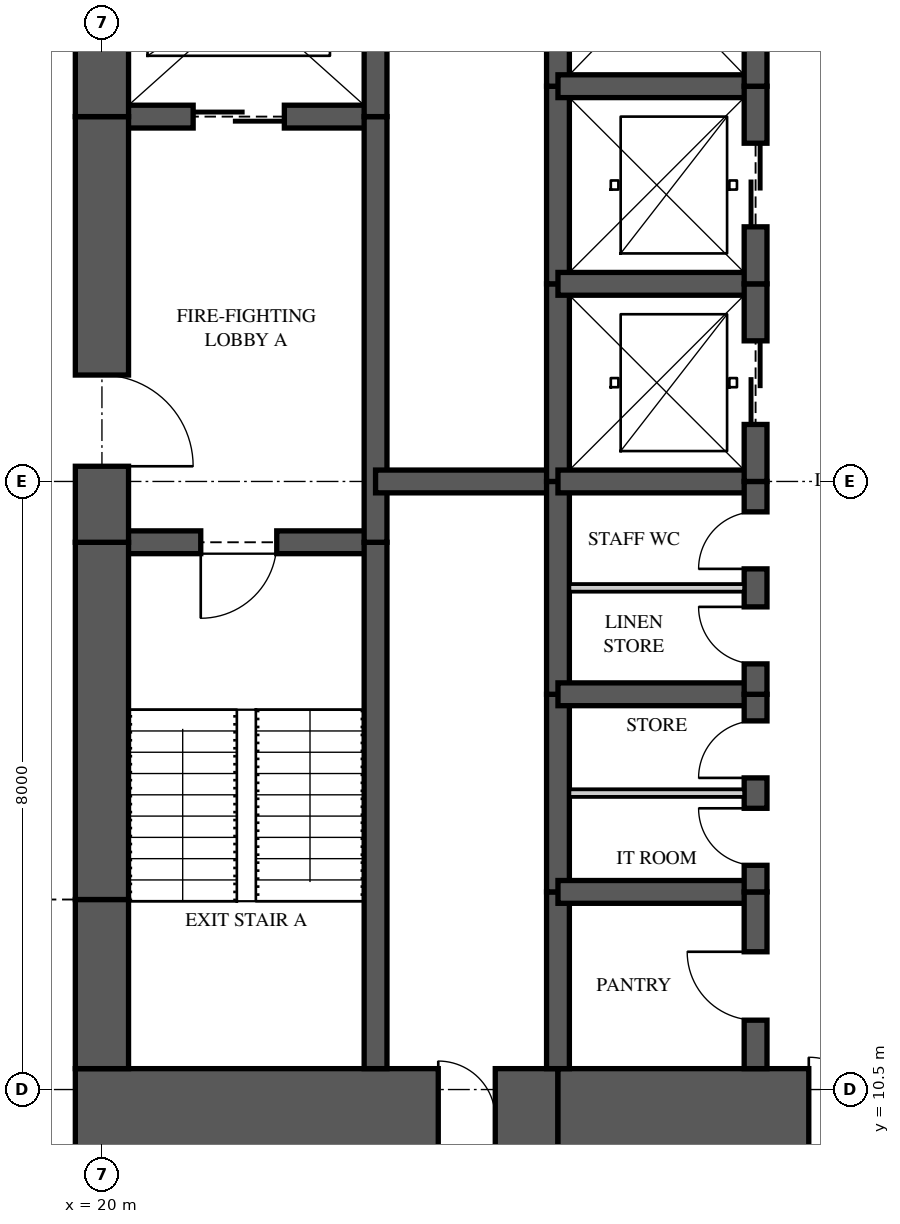
"""IFC4 building model, lengths in metres.
Left out: names, types, materials, properties, quantities, classifications, styles, units other than length and angle.
Written with IfcOpenShell. Run it as: python <this file> out.ifc"""

import sys

from ifc_helpers import new_model, si_unit, direction, frame, frame_2d, origin, place, context, subcontext, project, spatial, rectangle, extrude, element, fill, save


model = new_model("IFC4")
c1 = context("Model", 3, precision=1e-05, world=origin(), true_north=direction((0.0, 1.0)))
c2 = subcontext(c1, "Body", "Model", "MODEL_VIEW")
j1 = project(units=[si_unit("LENGTHUNIT", "METRE"), si_unit("PLANEANGLEUNIT", "RADIAN")], contexts=[c1])
p1 = place(None, origin())
s1 = spatial("IfcSite", under=j1, at=p1, CompositionType="ELEMENT")
p2 = place(p1, origin())
s2 = spatial("IfcBuilding", under=s1, at=p2, CompositionType="ELEMENT")
p3 = place(p2, frame((0.0, 0.0, 191.2)))
s3 = spatial("IfcBuildingStorey", under=s2, at=p3, CompositionType="ELEMENT", Elevation=191.2)
p4 = place(p3, frame((19.65, 10.125, 0.0), z_axis=(0.0, 0.0, 1.0), x_axis=(1.0, 0.0, 0.0)))
e1 = element("IfcWall", 1, at=p4, inside=s3, PredefinedType="SHEAR", context=c2, shape_type="SweptSolid", body=[
    extrude(rectangle(XDim=6.35, YDim=1.3, at=frame_2d((3.175, 0.0))), origin(), (0.0, 0.0, 1.0), 3.35),
])
p5 = place(p4, frame((4.775, 0.0, 0.0)))
e2 = element("IfcOpeningElement", 2, at=p5, cuts=e1, PredefinedType="OPENING", context=c2, shape_type="SweptSolid", body=[
    extrude(rectangle(XDim=0.75, YDim=2.1, at=frame_2d((0.375, 1.05))), frame((0.0, 0.66, 0.0), z_axis=(0.0, -1.0, 0.0), x_axis=(1.0, 0.0, 0.0)), (0.0, 0.0, 1.0), 1.32),
])
p6 = place(p3, frame((26.0, 10.125, 0.0), z_axis=(0.0, 0.0, 1.0), x_axis=(1.0, 0.0, 0.0)))
e3 = element("IfcWall", 3, at=p6, inside=s3, PredefinedType="SHEAR", context=c2, shape_type="SweptSolid", body=[
    extrude(rectangle(XDim=5.6, YDim=1.3, at=frame_2d((2.8, 0.0))), origin(), (0.0, 0.0, 1.0), 3.35),
])
p7 = place(p6, frame((3.3, 0.0, 0.0)))
e4 = element("IfcOpeningElement", 4, at=p7, cuts=e3, PredefinedType="OPENING", context=c2, shape_type="SweptSolid", body=[
    extrude(rectangle(XDim=1.6, YDim=2.1, at=frame_2d((0.8, 1.05))), frame((0.0, 0.66, 0.0), z_axis=(0.0, -1.0, 0.0), x_axis=(1.0, 0.0, 0.0)), (0.0, 0.0, 1.0), 1.32),
])
p8 = place(p3, frame((20.0, 26.225, 0.0), z_axis=(0.0, 0.0, 1.0), x_axis=(0.0, -1.0, 0.0)))
e5 = element("IfcWall", 5, at=p8, inside=s3, PredefinedType="SHEAR", context=c2, shape_type="SweptSolid", body=[
    extrude(rectangle(XDim=2.925, YDim=0.7, at=frame_2d((1.462, 0.0))), origin(), (0.0, 0.0, 1.0), 3.35),
])
p9 = place(p3, frame((20.0, 23.3, 0.0), z_axis=(0.0, 0.0, 1.0), x_axis=(0.0, -1.0, 0.0)))
e6 = element("IfcWall", 6, at=p9, inside=s3, PredefinedType="SHEAR", context=c2, shape_type="SweptSolid", body=[
    extrude(rectangle(XDim=5.6, YDim=0.7, at=frame_2d((2.8, 0.0))), origin(), (0.0, 0.0, 1.0), 3.35),
])
p10 = place(p9, frame((3.4, 0.0, 0.0)))
e7 = element("IfcOpeningElement", 7, at=p10, cuts=e6, PredefinedType="OPENING", context=c2, shape_type="SweptSolid", body=[
    extrude(rectangle(XDim=1.2, YDim=2.2, at=frame_2d((0.6, 1.1))), frame((0.0, 0.36, 0.0), z_axis=(0.0, -1.0, 0.0), x_axis=(1.0, 0.0, 0.0)), (0.0, 0.0, 1.0), 0.72),
])
p11 = place(p3, frame((20.0, 17.7, 0.0), z_axis=(0.0, 0.0, 1.0), x_axis=(0.0, -1.0, 0.0)))
e8 = element("IfcWall", 8, at=p11, inside=s3, PredefinedType="SHEAR", context=c2, shape_type="SweptSolid", body=[
    extrude(rectangle(XDim=4.7, YDim=0.7, at=frame_2d((2.35, 0.0))), origin(), (0.0, 0.0, 1.0), 3.35),
])
p12 = place(p3, frame((20.0, 13.0, 0.0), z_axis=(0.0, 0.0, 1.0), x_axis=(0.0, -1.0, 0.0)))
e9 = element("IfcWall", 9, at=p12, inside=s3, PredefinedType="SHEAR", context=c2, shape_type="SweptSolid", body=[
    extrude(rectangle(XDim=2.225, YDim=0.7, at=frame_2d((1.113, 0.0))), origin(), (0.0, 0.0, 1.0), 3.35),
])
p13 = place(p3, frame((23.6, 10.775, 0.0), z_axis=(0.0, 0.0, 1.0), x_axis=(0.0, 1.0, 0.0)))
e10 = element("IfcWall", 10, at=p13, inside=s3, PredefinedType="SHEAR", context=c2, shape_type="SweptSolid", body=[
    extrude(rectangle(XDim=6.925, YDim=0.3, at=frame_2d((3.462, 0.0))), origin(), (0.0, 0.0, 1.0), 3.35),
])
p14 = place(p3, frame((23.6, 17.7, 0.0), z_axis=(0.0, 0.0, 1.0), x_axis=(0.0, 1.0, 0.0)))
e11 = element("IfcWall", 11, at=p14, inside=s3, PredefinedType="SHEAR", context=c2, shape_type="SweptSolid", body=[
    extrude(rectangle(XDim=5.6, YDim=0.3, at=frame_2d((2.8, 0.0))), origin(), (0.0, 0.0, 1.0), 3.35),
])
p15 = place(p3, frame((23.6, 23.3, 0.0), z_axis=(0.0, 0.0, 1.0), x_axis=(0.0, 1.0, 0.0)))
e12 = element("IfcWall", 12, at=p15, inside=s3, PredefinedType="SHEAR", context=c2, shape_type="SweptSolid", body=[
    extrude(rectangle(XDim=2.925, YDim=0.3, at=frame_2d((1.462, 0.0))), origin(), (0.0, 0.0, 1.0), 3.35),
])
p16 = place(p3, frame((26.0, 10.775, 0.0), z_axis=(0.0, 0.0, 1.0), x_axis=(0.0, 1.0, 0.0)))
e13 = element("IfcWall", 13, at=p16, inside=s3, PredefinedType="SHEAR", context=c2, shape_type="SweptSolid", body=[
    extrude(rectangle(XDim=2.325, YDim=0.3, at=frame_2d((1.163, 0.0))), origin(), (0.0, 0.0, 1.0), 3.35),
])
p17 = place(p3, frame((26.0, 13.1, 0.0), z_axis=(0.0, 0.0, 1.0), x_axis=(0.0, 1.0, 0.0)))
e14 = element("IfcWall", 14, at=p17, inside=s3, PredefinedType="SHEAR", context=c2, shape_type="SweptSolid", body=[
    extrude(rectangle(XDim=2.6, YDim=0.3, at=frame_2d((1.3, 0.0))), origin(), (0.0, 0.0, 1.0), 3.35),
])
p18 = place(p3, frame((26.0, 15.7, 0.0), z_axis=(0.0, 0.0, 1.0), x_axis=(0.0, 1.0, 0.0)))
e15 = element("IfcWall", 15, at=p18, inside=s3, PredefinedType="SHEAR", context=c2, shape_type="SweptSolid", body=[
    extrude(rectangle(XDim=2.8, YDim=0.3, at=frame_2d((1.4, 0.0))), origin(), (0.0, 0.0, 1.0), 3.35),
])
p19 = place(p3, frame((26.0, 18.5, 0.0), z_axis=(0.0, 0.0, 1.0), x_axis=(0.0, 1.0, 0.0)))
e16 = element("IfcWall", 16, at=p19, inside=s3, PredefinedType="SHEAR", context=c2, shape_type="SweptSolid", body=[
    extrude(rectangle(XDim=2.6, YDim=0.3, at=frame_2d((1.3, 0.0))), origin(), (0.0, 0.0, 1.0), 3.35),
])
p20 = place(p3, frame((26.0, 21.1, 0.0), z_axis=(0.0, 0.0, 1.0), x_axis=(0.0, 1.0, 0.0)))
e17 = element("IfcWall", 17, at=p20, inside=s3, PredefinedType="SHEAR", context=c2, shape_type="SweptSolid", body=[
    extrude(rectangle(XDim=2.6, YDim=0.3, at=frame_2d((1.3, 0.0))), origin(), (0.0, 0.0, 1.0), 3.35),
])
p21 = place(p3, frame((26.0, 23.7, 0.0), z_axis=(0.0, 0.0, 1.0), x_axis=(0.0, 1.0, 0.0)))
e18 = element("IfcWall", 18, at=p21, inside=s3, PredefinedType="SHEAR", context=c2, shape_type="SweptSolid", body=[
    extrude(rectangle(XDim=2.525, YDim=0.3, at=frame_2d((1.263, 0.0))), origin(), (0.0, 0.0, 1.0), 3.35),
])
p22 = place(p3, frame((28.6, 10.775, 0.0), z_axis=(0.0, 0.0, 1.0), x_axis=(0.0, 1.0, 0.0)))
e19 = element("IfcWall", 19, at=p22, inside=s3, PredefinedType="SHEAR", context=c2, shape_type="SweptSolid", body=[
    extrude(rectangle(XDim=2.325, YDim=0.3, at=frame_2d((1.163, 0.0))), origin(), (0.0, 0.0, 1.0), 3.35),
])
p23 = place(p22, frame((0.637, 0.0, 0.0)))
e20 = element("IfcOpeningElement", 20, at=p23, cuts=e19, PredefinedType="OPENING", context=c2, shape_type="SweptSolid", body=[
    extrude(rectangle(XDim=0.9, YDim=2.1, at=frame_2d((0.45, 1.05))), frame((0.0, 0.16, 0.0), z_axis=(0.0, -1.0, 0.0), x_axis=(1.0, 0.0, 0.0)), (0.0, 0.0, 1.0), 0.32),
])
p24 = place(p3, frame((28.6, 13.1, 0.0), z_axis=(0.0, 0.0, 1.0), x_axis=(0.0, 1.0, 0.0)))
e21 = element("IfcWall", 21, at=p24, inside=s3, PredefinedType="SHEAR", context=c2, shape_type="SweptSolid", body=[
    extrude(rectangle(XDim=2.6, YDim=0.3, at=frame_2d((1.3, 0.0))), origin(), (0.0, 0.0, 1.0), 3.35),
])
p25 = place(p24, frame((0.35, 0.0, 0.0)))
e22 = element("IfcOpeningElement", 22, at=p25, cuts=e21, PredefinedType="OPENING", context=c2, shape_type="SweptSolid", body=[
    extrude(rectangle(XDim=0.75, YDim=2.1, at=frame_2d((0.375, 1.05))), frame((0.0, 0.16, 0.0), z_axis=(0.0, -1.0, 0.0), x_axis=(1.0, 0.0, 0.0)), (0.0, 0.0, 1.0), 0.32),
])
p26 = place(p24, frame((1.5, 0.0, 0.0)))
e23 = element("IfcOpeningElement", 23, at=p26, cuts=e21, PredefinedType="OPENING", context=c2, shape_type="SweptSolid", body=[
    extrude(rectangle(XDim=0.75, YDim=2.1, at=frame_2d((0.375, 1.05))), frame((0.0, 0.16, 0.0), z_axis=(0.0, -1.0, 0.0), x_axis=(1.0, 0.0, 0.0)), (0.0, 0.0, 1.0), 0.32),
])
p27 = place(p3, frame((28.6, 15.7, 0.0), z_axis=(0.0, 0.0, 1.0), x_axis=(0.0, 1.0, 0.0)))
e24 = element("IfcWall", 24, at=p27, inside=s3, PredefinedType="SHEAR", context=c2, shape_type="SweptSolid", body=[
    extrude(rectangle(XDim=2.8, YDim=0.3, at=frame_2d((1.4, 0.0))), origin(), (0.0, 0.0, 1.0), 3.35),
])
p28 = place(p27, frame((0.4, 0.0, 0.0)))
e25 = element("IfcOpeningElement", 25, at=p28, cuts=e24, PredefinedType="OPENING", context=c2, shape_type="SweptSolid", body=[
    extrude(rectangle(XDim=0.75, YDim=2.1, at=frame_2d((0.375, 1.05))), frame((0.0, 0.16, 0.0), z_axis=(0.0, -1.0, 0.0), x_axis=(1.0, 0.0, 0.0)), (0.0, 0.0, 1.0), 0.32),
])
p29 = place(p27, frame((1.65, 0.0, 0.0)))
e26 = element("IfcOpeningElement", 26, at=p29, cuts=e24, PredefinedType="OPENING", context=c2, shape_type="SweptSolid", body=[
    extrude(rectangle(XDim=0.75, YDim=2.1, at=frame_2d((0.375, 1.05))), frame((0.0, 0.16, 0.0), z_axis=(0.0, -1.0, 0.0), x_axis=(1.0, 0.0, 0.0)), (0.0, 0.0, 1.0), 0.32),
])
p30 = place(p3, frame((28.6, 18.5, 0.0), z_axis=(0.0, 0.0, 1.0), x_axis=(0.0, 1.0, 0.0)))
e27 = element("IfcWall", 27, at=p30, inside=s3, PredefinedType="SHEAR", context=c2, shape_type="SweptSolid", body=[
    extrude(rectangle(XDim=2.6, YDim=0.3, at=frame_2d((1.3, 0.0))), origin(), (0.0, 0.0, 1.0), 3.35),
])
p31 = place(p30, frame((0.75, 0.0, 0.0)))
e28 = element("IfcOpeningElement", 28, at=p31, cuts=e27, PredefinedType="OPENING", context=c2, shape_type="SweptSolid", body=[
    extrude(rectangle(XDim=1.1, YDim=2.1, at=frame_2d((0.55, 1.05))), frame((0.0, 0.16, 0.0), z_axis=(0.0, -1.0, 0.0), x_axis=(1.0, 0.0, 0.0)), (0.0, 0.0, 1.0), 0.32),
])
p32 = place(p3, frame((28.6, 21.1, 0.0), z_axis=(0.0, 0.0, 1.0), x_axis=(0.0, 1.0, 0.0)))
e29 = element("IfcWall", 29, at=p32, inside=s3, PredefinedType="SHEAR", context=c2, shape_type="SweptSolid", body=[
    extrude(rectangle(XDim=2.6, YDim=0.3, at=frame_2d((1.3, 0.0))), origin(), (0.0, 0.0, 1.0), 3.35),
])
p33 = place(p32, frame((0.75, 0.0, 0.0)))
e30 = element("IfcOpeningElement", 30, at=p33, cuts=e29, PredefinedType="OPENING", context=c2, shape_type="SweptSolid", body=[
    extrude(rectangle(XDim=1.1, YDim=2.1, at=frame_2d((0.55, 1.05))), frame((0.0, 0.16, 0.0), z_axis=(0.0, -1.0, 0.0), x_axis=(1.0, 0.0, 0.0)), (0.0, 0.0, 1.0), 0.32),
])
p34 = place(p3, frame((28.6, 23.7, 0.0), z_axis=(0.0, 0.0, 1.0), x_axis=(0.0, 1.0, 0.0)))
e31 = element("IfcWall", 31, at=p34, inside=s3, PredefinedType="SHEAR", context=c2, shape_type="SweptSolid", body=[
    extrude(rectangle(XDim=2.525, YDim=0.3, at=frame_2d((1.263, 0.0))), origin(), (0.0, 0.0, 1.0), 3.35),
])
p35 = place(p34, frame((0.85, 0.0, 0.0)))
e32 = element("IfcOpeningElement", 32, at=p35, cuts=e31, PredefinedType="OPENING", context=c2, shape_type="SweptSolid", body=[
    extrude(rectangle(XDim=1.1, YDim=2.1, at=frame_2d((0.55, 1.05))), frame((0.0, 0.16, 0.0), z_axis=(0.0, -1.0, 0.0), x_axis=(1.0, 0.0, 0.0)), (0.0, 0.0, 1.0), 0.32),
])
p36 = place(p3, frame((20.0, 17.7, 0.0), z_axis=(0.0, 0.0, 1.0), x_axis=(1.0, 0.0, 0.0)))
e33 = element("IfcWall", 33, at=p36, inside=s3, PredefinedType="SHEAR", context=c2, shape_type="SweptSolid", body=[
    extrude(rectangle(XDim=3.6, YDim=0.3, at=frame_2d((1.8, 0.0))), origin(), (0.0, 0.0, 1.0), 3.35),
])
p37 = place(p36, frame((1.3, 0.0, 0.0)))
e34 = element("IfcOpeningElement", 34, at=p37, cuts=e33, PredefinedType="OPENING", context=c2, shape_type="SweptSolid", body=[
    extrude(rectangle(XDim=1.0, YDim=2.1, at=frame_2d((0.5, 1.05))), frame((0.0, 0.16, 0.0), z_axis=(0.0, -1.0, 0.0), x_axis=(1.0, 0.0, 0.0)), (0.0, 0.0, 1.0), 0.32),
])
p38 = place(p3, frame((20.0, 23.3, 0.0), z_axis=(0.0, 0.0, 1.0), x_axis=(1.0, 0.0, 0.0)))
e35 = element("IfcWall", 35, at=p38, inside=s3, PredefinedType="SHEAR", context=c2, shape_type="SweptSolid", body=[
    extrude(rectangle(XDim=3.6, YDim=0.3, at=frame_2d((1.8, 0.0))), origin(), (0.0, 0.0, 1.0), 3.35),
])
p39 = place(p38, frame((1.2, 0.0, 0.0)))
e36 = element("IfcOpeningElement", 36, at=p39, cuts=e35, PredefinedType="OPENING", context=c2, shape_type="SweptSolid", body=[
    extrude(rectangle(XDim=1.2, YDim=2.1, at=frame_2d((0.6, 1.05))), frame((0.0, 0.16, 0.0), z_axis=(0.0, -1.0, 0.0), x_axis=(1.0, 0.0, 0.0)), (0.0, 0.0, 1.0), 0.32),
])
p40 = place(p3, frame((23.6, 18.5, 0.0), z_axis=(0.0, 0.0, 1.0), x_axis=(1.0, 0.0, 0.0)))
e37 = element("IfcWall", 37, at=p40, inside=s3, PredefinedType="SHEAR", context=c2, shape_type="SweptSolid", body=[
    extrude(rectangle(XDim=2.4, YDim=0.3, at=frame_2d((1.2, 0.0))), origin(), (0.0, 0.0, 1.0), 3.35),
])
for number, where, z_axis, x_axis in (
    (38, (26.0, 13.1, 0.0), (0.0, 0.0, 1.0), (1.0, 0.0, 0.0)),
    (39, (26.0, 15.7, 0.0), (0.0, 0.0, 1.0), (1.0, 0.0, 0.0)),
    (40, (26.0, 18.5, 0.0), (0.0, 0.0, 1.0), (1.0, 0.0, 0.0)),
    (41, (26.0, 21.1, 0.0), (0.0, 0.0, 1.0), (1.0, 0.0, 0.0)),
    (42, (26.0, 23.7, 0.0), (0.0, 0.0, 1.0), (1.0, 0.0, 0.0)),
):
    element("IfcWall", number, at=place(p3, frame(where, z_axis=z_axis, x_axis=x_axis)), inside=s3, PredefinedType="SHEAR", context=c2, shape_type="SweptSolid", body=[
        extrude(rectangle(XDim=2.6, YDim=0.3, at=frame_2d((1.3, 0.0))), origin(), (0.0, 0.0, 1.0), 3.35),
    ])
for number, where, z_axis, x_axis in (
    (43, (26.15, 14.4, 0.0), (0.0, 0.0, 1.0), (1.0, 0.0, 0.0)),
    (44, (26.15, 17.1, 0.0), (0.0, 0.0, 1.0), (1.0, 0.0, 0.0)),
):
    element("IfcWall", number, at=place(p3, frame(where, z_axis=z_axis, x_axis=x_axis)), inside=s3, PredefinedType="PARTITIONING", context=c2, shape_type="SweptSolid", body=[
        extrude(rectangle(XDim=2.3, YDim=0.1, at=frame_2d((1.15, 0.0))), origin(), (0.0, 0.0, 1.0), 3.11),
    ])
p41 = place(p37, frame((1.0, 0.0, 0.0), z_axis=(0.0, 0.0, 1.0), x_axis=(-1.0, 0.0, 0.0)))
e45 = element("IfcDoor", 45, at=p41, inside=s3, OperationType="SINGLE_SWING_RIGHT", PredefinedType="DOOR", context=c2, shape_type="SweptSolid", body=[
    extrude(rectangle(XDim=1.0, YDim=2.1, at=frame_2d((0.5, 1.05))), frame((0.0, 0.025, 0.0), z_axis=(0.0, -1.0, 0.0), x_axis=(1.0, 0.0, 0.0)), (0.0, 0.0, 1.0), 0.05),
])
fill(e34, e45)
p42 = place(p10, origin())
e46 = element("IfcDoor", 46, at=p42, inside=s3, OperationType="SINGLE_SWING_RIGHT", PredefinedType="DOOR", context=c2, shape_type="SweptSolid", body=[
    extrude(rectangle(XDim=1.2, YDim=2.2, at=frame_2d((0.6, 1.1))), frame((0.0, 0.025, 0.0), z_axis=(0.0, -1.0, 0.0), x_axis=(1.0, 0.0, 0.0)), (0.0, 0.0, 1.0), 0.05),
])
fill(e7, e46)
p43 = place(p39, origin())
e47 = element("IfcDoor", 47, at=p43, inside=s3, OperationType="SLIDING_TO_LEFT", PredefinedType="DOOR", context=c2, shape_type="SweptSolid", body=[
    extrude(rectangle(XDim=1.2, YDim=2.1, at=frame_2d((0.6, 1.05))), frame((0.0, 0.025, 0.0), z_axis=(0.0, -1.0, 0.0), x_axis=(1.0, 0.0, 0.0)), (0.0, 0.0, 1.0), 0.05),
])
fill(e36, e47)
p44 = place(p31, origin())
e48 = element("IfcDoor", 48, at=p44, inside=s3, OperationType="SLIDING_TO_LEFT", PredefinedType="DOOR", context=c2, shape_type="SweptSolid", body=[
    extrude(rectangle(XDim=1.1, YDim=2.1, at=frame_2d((0.55, 1.05))), frame((0.0, 0.025, 0.0), z_axis=(0.0, -1.0, 0.0), x_axis=(1.0, 0.0, 0.0)), (0.0, 0.0, 1.0), 0.05),
])
fill(e28, e48)
p45 = place(p33, origin())
e49 = element("IfcDoor", 49, at=p45, inside=s3, OperationType="SLIDING_TO_LEFT", PredefinedType="DOOR", context=c2, shape_type="SweptSolid", body=[
    extrude(rectangle(XDim=1.1, YDim=2.1, at=frame_2d((0.55, 1.05))), frame((0.0, 0.025, 0.0), z_axis=(0.0, -1.0, 0.0), x_axis=(1.0, 0.0, 0.0)), (0.0, 0.0, 1.0), 0.05),
])
fill(e30, e49)
p46 = place(p23, origin())
e50 = element("IfcDoor", 50, at=p46, inside=s3, OperationType="SINGLE_SWING_RIGHT", PredefinedType="DOOR", context=c2, shape_type="SweptSolid", body=[
    extrude(rectangle(XDim=0.9, YDim=2.1, at=frame_2d((0.45, 1.05))), frame((0.0, 0.025, 0.0), z_axis=(0.0, -1.0, 0.0), x_axis=(1.0, 0.0, 0.0)), (0.0, 0.0, 1.0), 0.05),
])
fill(e20, e50)
p47 = place(p25, origin())
e51 = element("IfcDoor", 51, at=p47, inside=s3, OperationType="SINGLE_SWING_RIGHT", PredefinedType="DOOR", context=c2, shape_type="SweptSolid", body=[
    extrude(rectangle(XDim=0.75, YDim=2.1, at=frame_2d((0.375, 1.05))), frame((0.0, 0.025, 0.0), z_axis=(0.0, -1.0, 0.0), x_axis=(1.0, 0.0, 0.0)), (0.0, 0.0, 1.0), 0.05),
])
fill(e22, e51)
p48 = place(p26, origin())
e52 = element("IfcDoor", 52, at=p48, inside=s3, OperationType="SINGLE_SWING_LEFT", PredefinedType="DOOR", context=c2, shape_type="SweptSolid", body=[
    extrude(rectangle(XDim=0.75, YDim=2.1, at=frame_2d((0.375, 1.05))), frame((0.0, 0.025, 0.0), z_axis=(0.0, -1.0, 0.0), x_axis=(1.0, 0.0, 0.0)), (0.0, 0.0, 1.0), 0.05),
])
fill(e23, e52)
p49 = place(p28, origin())
e53 = element("IfcDoor", 53, at=p49, inside=s3, OperationType="SINGLE_SWING_RIGHT", PredefinedType="DOOR", context=c2, shape_type="SweptSolid", body=[
    extrude(rectangle(XDim=0.75, YDim=2.1, at=frame_2d((0.375, 1.05))), frame((0.0, 0.025, 0.0), z_axis=(0.0, -1.0, 0.0), x_axis=(1.0, 0.0, 0.0)), (0.0, 0.0, 1.0), 0.05),
])
fill(e25, e53)
p50 = place(p29, origin())
e54 = element("IfcDoor", 54, at=p50, inside=s3, OperationType="SINGLE_SWING_LEFT", PredefinedType="DOOR", context=c2, shape_type="SweptSolid", body=[
    extrude(rectangle(XDim=0.75, YDim=2.1, at=frame_2d((0.375, 1.05))), frame((0.0, 0.025, 0.0), z_axis=(0.0, -1.0, 0.0), x_axis=(1.0, 0.0, 0.0)), (0.0, 0.0, 1.0), 0.05),
])
fill(e26, e54)
p51 = place(p7, origin())
e55 = element("IfcDoor", 55, at=p51, inside=s3, OperationType="DOUBLE_DOOR_SINGLE_SWING", PredefinedType="DOOR", context=c2, shape_type="SweptSolid", body=[
    extrude(rectangle(XDim=1.6, YDim=2.1, at=frame_2d((0.8, 1.05))), frame((0.0, 0.025, 0.0), z_axis=(0.0, -1.0, 0.0), x_axis=(1.0, 0.0, 0.0)), (0.0, 0.0, 1.0), 0.05),
])
fill(e4, e55)
p52 = place(p5, origin())
e56 = element("IfcDoor", 56, at=p52, inside=s3, OperationType="SINGLE_SWING_LEFT", PredefinedType="DOOR", context=c2, shape_type="SweptSolid", body=[
    extrude(rectangle(XDim=0.75, YDim=2.1, at=frame_2d((0.375, 1.05))), frame((0.0, 0.025, 0.0), z_axis=(0.0, -1.0, 0.0), x_axis=(1.0, 0.0, 0.0)), (0.0, 0.0, 1.0), 0.05),
])
fill(e2, e56)
save(model, sys.argv[1])
